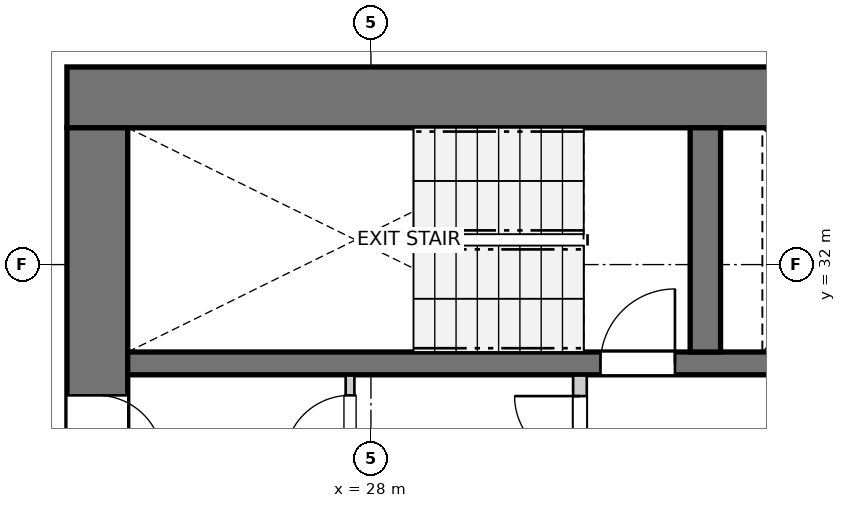
"""IFC4 building model, lengths in metres.
Left out: names, types, materials, properties, quantities, classifications, styles, units other than length and angle.
Written with IfcOpenShell. Run it as: python <this file> out.ifc"""

import sys

from ifc_helpers import new_model, si_unit, direction, frame, frame_2d, origin, place, context, subcontext, project, spatial, rectangle, extrude, source, transform, mapped, element, fill, save


model = new_model("IFC4")
c1 = context("Model", 3, precision=1e-05, world=origin(), true_north=direction((0.0, 1.0)))
c2 = subcontext(c1, "Body", "Model", "MODEL_VIEW")
j1 = project(units=[si_unit("LENGTHUNIT", "METRE"), si_unit("PLANEANGLEUNIT", "RADIAN")], contexts=[c1])
p1 = place(None, origin())
s1 = spatial("IfcSite", under=j1, at=p1, CompositionType="ELEMENT")
p2 = place(p1, origin())
s2 = spatial("IfcBuilding", under=s1, at=p2, CompositionType="ELEMENT")
p3 = place(p2, frame((0.0, 0.0, 17.4)))
s3 = spatial("IfcBuildingStorey", under=s2, at=p3, CompositionType="ELEMENT", Elevation=17.4)
p4 = place(p3, frame((36.7, 34.2, 0.0), z_axis=(0.0, 0.0, 1.0), x_axis=(-1.0, 0.0, 0.0)))
e1 = element("IfcWall", 1, at=p4, inside=s3, PredefinedType="SHEAR", context=c2, shape_type="SweptSolid", body=[
    extrude(rectangle(XDim=12.7, YDim=0.8, at=frame_2d((6.35, 0.0))), origin(), (0.0, 0.0, 1.0), 2.94),
])
p5 = place(p3, frame((24.4, 33.8, 0.0), z_axis=(0.0, 0.0, 1.0), x_axis=(0.0, -1.0, 0.0)))
e2 = element("IfcWall", 2, at=p5, inside=s3, PredefinedType="SHEAR", context=c2, shape_type="SweptSolid", body=[
    extrude(rectangle(XDim=15.6, YDim=0.8, at=frame_2d((7.8, 0.0))), origin(), (0.0, 0.0, 1.0), 2.94),
])
p6 = place(p5, frame((7.05, 0.0, 0.0)))
e3 = element("IfcOpeningElement", 3, at=p6, cuts=e2, PredefinedType="OPENING", context=c2, shape_type="SweptSolid", body=[
    extrude(rectangle(XDim=1.5, YDim=2.15, at=frame_2d((0.75, 1.075))), frame((0.0, 0.41, 0.0), z_axis=(0.0, -1.0, 0.0), x_axis=(1.0, 0.0, 0.0)), (0.0, 0.0, 1.0), 0.82),
])
p7 = place(p5, frame((3.52, 0.0, 0.0)))
e4 = element("IfcOpeningElement", 4, at=p7, cuts=e2, PredefinedType="OPENING", context=c2, shape_type="SweptSolid", body=[
    extrude(rectangle(XDim=0.86, YDim=2.05, at=frame_2d((0.43, 1.025))), frame((0.0, 0.41, 0.0), z_axis=(0.0, -1.0, 0.0), x_axis=(1.0, 0.0, 0.0)), (0.0, 0.0, 1.0), 0.82),
])
p8 = place(p5, frame((11.22, 0.0, 0.0)))
e5 = element("IfcOpeningElement", 5, at=p8, cuts=e2, PredefinedType="OPENING", context=c2, shape_type="SweptSolid", body=[
    extrude(rectangle(XDim=0.86, YDim=2.05, at=frame_2d((0.43, 1.025))), frame((0.0, 0.41, 0.0), z_axis=(0.0, -1.0, 0.0), x_axis=(1.0, 0.0, 0.0)), (0.0, 0.0, 1.0), 0.82),
])
p9 = place(p3, frame((24.8, 30.7, 0.0), z_axis=(0.0, 0.0, 1.0), x_axis=(1.0, 0.0, 0.0)))
e6 = element("IfcWall", 6, at=p9, inside=s3, PredefinedType="SHEAR", context=c2, shape_type="SweptSolid", body=[
    extrude(rectangle(XDim=11.1, YDim=0.3, at=frame_2d((5.55, 0.0))), origin(), (0.0, 0.0, 1.0), 2.94),
])
p10 = place(p9, frame((6.22, 0.0, 0.0)))
e7 = element("IfcOpeningElement", 7, at=p10, cuts=e6, PredefinedType="OPENING", context=c2, shape_type="SweptSolid", body=[
    extrude(rectangle(XDim=0.98, YDim=2.15, at=frame_2d((0.49, 1.075))), frame((0.0, 0.16, 0.0), z_axis=(0.0, -1.0, 0.0), x_axis=(1.0, 0.0, 0.0)), (0.0, 0.0, 1.0), 0.32),
])
p11 = place(p9, frame((9.15, 0.0, 0.0)))
e8 = element("IfcOpeningElement", 8, at=p11, cuts=e6, PredefinedType="OPENING", context=c2, shape_type="SweptSolid", body=[
    extrude(rectangle(XDim=1.15, YDim=2.15, at=frame_2d((0.575, 1.075))), frame((0.0, 0.16, 0.0), z_axis=(0.0, -1.0, 0.0), x_axis=(1.0, 0.0, 0.0)), (0.0, 0.0, 1.0), 0.32),
])
p12 = place(p3, frame((32.4, 30.85, 0.0), z_axis=(0.0, 0.0, 1.0), x_axis=(0.0, 1.0, 0.0)))
e9 = element("IfcWall", 9, at=p12, inside=s3, PredefinedType="SHEAR", context=c2, shape_type="SweptSolid", body=[
    extrude(rectangle(XDim=2.95, YDim=0.4, at=frame_2d((1.475, 0.0))), origin(), (0.0, 0.0, 1.0), 2.94),
])
p13 = place(p3, frame((30.75, 27.43, 0.0), z_axis=(0.0, 0.0, 1.0), x_axis=(0.0, 1.0, 0.0)))
e10 = element("IfcWall", 10, at=p13, inside=s3, PredefinedType="PARTITIONING", context=c2, shape_type="SweptSolid", body=[
    extrude(rectangle(XDim=3.11, YDim=0.18, at=frame_2d((1.555, 0.0))), origin(), (0.0, 0.0, 1.0), 2.94),
])
p14 = place(p13, frame((1.98, 0.0, 0.0)))
e11 = element("IfcOpeningElement", 11, at=p14, cuts=e10, PredefinedType="OPENING", context=c2, shape_type="SweptSolid", body=[
    extrude(rectangle(XDim=0.86, YDim=2.05, at=frame_2d((0.43, 1.025))), frame((0.0, 0.1, 0.0), z_axis=(0.0, -1.0, 0.0), x_axis=(1.0, 0.0, 0.0)), (0.0, 0.0, 1.0), 0.2),
])
p15 = place(p3, frame((27.725, 29.16, 0.0), z_axis=(0.0, 0.0, 1.0), x_axis=(0.0, 1.0, 0.0)))
e12 = element("IfcWall", 12, at=p15, inside=s3, PredefinedType="PARTITIONING", context=c2, shape_type="SweptSolid", body=[
    extrude(rectangle(XDim=1.38, YDim=0.115, at=frame_2d((0.69, 0.0))), origin(), (0.0, 0.0, 1.0), 2.94),
])
p16 = place(p15, frame((0.26, 0.0, 0.0)))
e13 = element("IfcOpeningElement", 13, at=p16, cuts=e12, PredefinedType="OPENING", context=c2, shape_type="SweptSolid", body=[
    extrude(rectangle(XDim=0.86, YDim=2.05, at=frame_2d((0.43, 1.025))), frame((0.0, 0.067, 0.0), z_axis=(0.0, -1.0, 0.0), x_axis=(1.0, 0.0, 0.0)), (0.0, 0.0, 1.0), 0.135),
])
m1 = source(origin(), c2, "Body", "SweptSolid", [
    extrude(rectangle(XDim=0.98, YDim=2.15, at=frame_2d((0.49, 1.075))), frame((0.0, 0.025, 0.0), z_axis=(0.0, -1.0, 0.0), x_axis=(1.0, 0.0, 0.0)), (0.0, 0.0, 1.0), 0.05),
])
p17 = place(p10, origin())
e14 = element("IfcDoor", 14, at=p17, inside=s3, OperationType="SINGLE_SWING_RIGHT", PredefinedType="DOOR", context=c2, shape_type="MappedRepresentation", body=[
    mapped(m1, transform((0.0, 0.0, 0.0), x_axis=(1.0, 0.0, 0.0), y_axis=(0.0, 1.0, 0.0), z_axis=(0.0, 0.0, 1.0), scale=1.0)),
])
fill(e7, e14)
m2 = source(origin(), c2, "Body", "SweptSolid", [
    extrude(rectangle(XDim=0.86, YDim=2.05, at=frame_2d((0.43, 1.025))), frame((0.0, 0.025, 0.0), z_axis=(0.0, -1.0, 0.0), x_axis=(1.0, 0.0, 0.0)), (0.0, 0.0, 1.0), 0.05),
])
p18 = place(p7, origin())
e15 = element("IfcDoor", 15, at=p18, inside=s3, OperationType="SINGLE_SWING_RIGHT", PredefinedType="DOOR", context=c2, shape_type="MappedRepresentation", body=[
    mapped(m2, transform((0.0, 0.0, 0.0), x_axis=(1.0, 0.0, 0.0), y_axis=(0.0, 1.0, 0.0), z_axis=(0.0, 0.0, 1.0), scale=1.0)),
])
fill(e4, e15)
p19 = place(p14, origin())
e16 = element("IfcDoor", 16, at=p19, inside=s3, OperationType="SINGLE_SWING_RIGHT", PredefinedType="DOOR", context=c2, shape_type="MappedRepresentation", body=[
    mapped(m2, transform((0.0, 0.0, 0.0), x_axis=(1.0, 0.0, 0.0), y_axis=(0.0, 1.0, 0.0), z_axis=(0.0, 0.0, 1.0), scale=1.0)),
])
fill(e11, e16)
p20 = place(p16, origin())
e17 = element("IfcDoor", 17, at=p20, inside=s3, OperationType="SINGLE_SWING_LEFT", PredefinedType="DOOR", context=c2, shape_type="MappedRepresentation", body=[
    mapped(m2, transform((0.0, 0.0, 0.0), x_axis=(1.0, 0.0, 0.0), y_axis=(0.0, 1.0, 0.0), z_axis=(0.0, 0.0, 1.0), scale=1.0)),
])
fill(e13, e17)
save(model, sys.argv[1])
